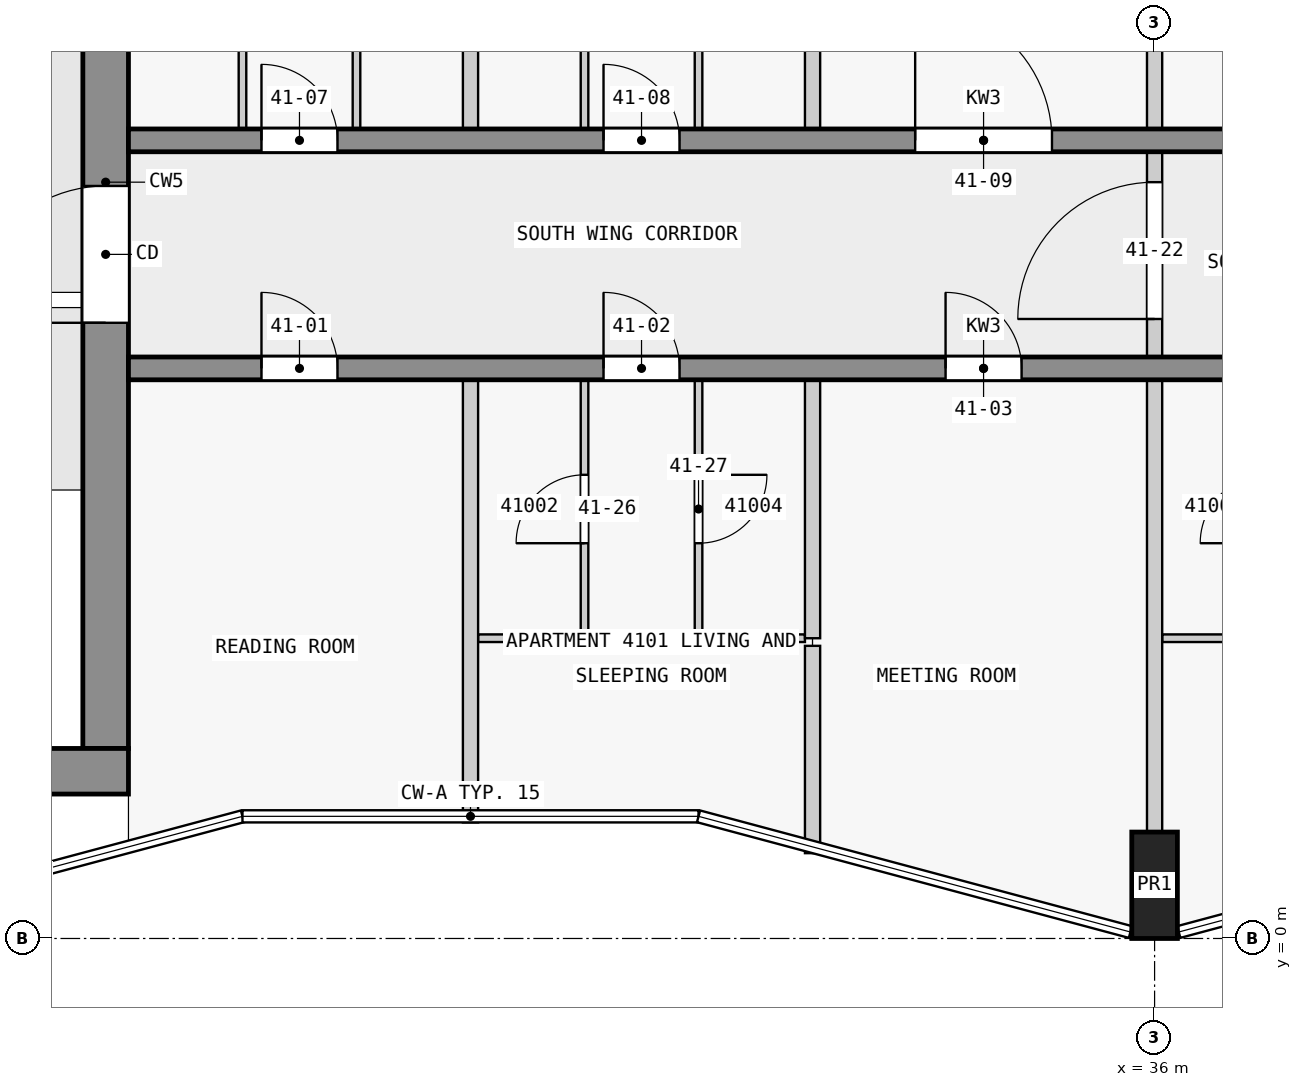
"""IFC4 building model, lengths in metres.
Left out: names, types, materials, properties, quantities, classifications, styles, units other than length and angle.
Written with IfcOpenShell. Run it as: python <this file> out.ifc"""

import sys

from ifc_helpers import new_model, si_unit, direction, frame, frame_2d, origin, origin_2d, place, context, subcontext, project, spatial, rectangle, extrude, element, fill, save


model = new_model("IFC4")
c1 = context("Model", 3, precision=1e-05, world=origin(), true_north=direction((0.0, 1.0)))
c2 = subcontext(c1, "Body", "Model", "MODEL_VIEW")
j1 = project(units=[si_unit("LENGTHUNIT", "METRE"), si_unit("PLANEANGLEUNIT", "RADIAN")], contexts=[c1])
p1 = place(None, origin())
s1 = spatial("IfcSite", under=j1, at=p1, CompositionType="ELEMENT")
p2 = place(p1, origin())
s2 = spatial("IfcBuilding", under=s1, at=p2, CompositionType="ELEMENT")
p3 = place(p2, frame((0.0, 0.0, 160.4)))
s3 = spatial("IfcBuildingStorey", under=s2, at=p3, CompositionType="ELEMENT", Elevation=160.4)
p4 = place(p3, frame((36.0, 0.7, 0.0), z_axis=(0.0, 0.0, 1.0), x_axis=(1.0, 0.0, 0.0)))
e1 = element("IfcColumn", 1, at=p4, inside=s3, PredefinedType="COLUMN", context=c2, shape_type="SweptSolid", body=[
    extrude(rectangle(XDim=0.6, YDim=1.4, at=origin_2d()), origin(), (0.0, 0.0, 1.0), 3.5),
])
p5 = place(p3, frame((1.7, 2.2, 0.0), z_axis=(0.0, 0.0, 1.0), x_axis=(1.0, 0.0, 0.0)))
e2 = element("IfcWall", 2, at=p5, inside=s3, PredefinedType="SHEAR", context=c2, shape_type="SweptSolid", body=[
    extrude(rectangle(XDim=20.8, YDim=0.6, at=frame_2d((10.4, 0.0))), origin(), (0.0, 0.0, 1.0), 3.25),
])
p6 = place(p3, frame((22.2, 2.5, 0.0), z_axis=(0.0, 0.0, 1.0), x_axis=(0.0, 1.0, 0.0)))
e3 = element("IfcWall", 3, at=p6, inside=s3, PredefinedType="SHEAR", context=c2, shape_type="SweptSolid", body=[
    extrude(rectangle(XDim=14.9, YDim=0.6, at=frame_2d((7.45, 0.0))), origin(), (0.0, 0.0, 1.0), 3.25),
])
p7 = place(p6, frame((5.6, 0.0, 0.0)))
e4 = element("IfcOpeningElement", 4, at=p7, cuts=e3, PredefinedType="OPENING", context=c2, shape_type="SweptSolid", body=[
    extrude(rectangle(XDim=1.8, YDim=2.1, at=frame_2d((0.9, 1.05))), frame((0.0, 0.31, 0.0), z_axis=(0.0, -1.0, 0.0), x_axis=(1.0, 0.0, 0.0)), (0.0, 0.0, 1.0), 0.62),
])
p8 = place(p3, frame((22.5, 7.5, 0.0), z_axis=(0.0, 0.0, 1.0), x_axis=(1.0, 0.0, 0.0)))
e5 = element("IfcWall", 5, at=p8, inside=s3, PredefinedType="SHEAR", context=c2, shape_type="SweptSolid", body=[
    extrude(rectangle(XDim=22.5, YDim=0.3, at=frame_2d((11.25, 0.0))), origin(), (0.0, 0.0, 1.0), 3.25),
])
p9 = place(p8, frame((1.75, 0.0, 0.0)))
e6 = element("IfcOpeningElement", 6, at=p9, cuts=e5, PredefinedType="OPENING", context=c2, shape_type="SweptSolid", body=[
    extrude(rectangle(XDim=1.0, YDim=2.1, at=frame_2d((0.5, 1.05))), frame((0.0, 0.16, 0.0), z_axis=(0.0, -1.0, 0.0), x_axis=(1.0, 0.0, 0.0)), (0.0, 0.0, 1.0), 0.32),
])
p10 = place(p8, frame((6.25, 0.0, 0.0)))
e7 = element("IfcOpeningElement", 7, at=p10, cuts=e5, PredefinedType="OPENING", context=c2, shape_type="SweptSolid", body=[
    extrude(rectangle(XDim=1.0, YDim=2.1, at=frame_2d((0.5, 1.05))), frame((0.0, 0.16, 0.0), z_axis=(0.0, -1.0, 0.0), x_axis=(1.0, 0.0, 0.0)), (0.0, 0.0, 1.0), 0.32),
])
p11 = place(p8, frame((10.75, 0.0, 0.0)))
e8 = element("IfcOpeningElement", 8, at=p11, cuts=e5, PredefinedType="OPENING", context=c2, shape_type="SweptSolid", body=[
    extrude(rectangle(XDim=1.0, YDim=2.1, at=frame_2d((0.5, 1.05))), frame((0.0, 0.16, 0.0), z_axis=(0.0, -1.0, 0.0), x_axis=(1.0, 0.0, 0.0)), (0.0, 0.0, 1.0), 0.32),
])
p12 = place(p8, frame((15.25, 0.0, 0.0)))
e9 = element("IfcOpeningElement", 9, at=p12, cuts=e5, PredefinedType="OPENING", context=c2, shape_type="SweptSolid", body=[
    extrude(rectangle(XDim=1.0, YDim=2.1, at=frame_2d((0.5, 1.05))), frame((0.0, 0.16, 0.0), z_axis=(0.0, -1.0, 0.0), x_axis=(1.0, 0.0, 0.0)), (0.0, 0.0, 1.0), 0.32),
])
p13 = place(p8, frame((18.75, 0.0, 0.0)))
e10 = element("IfcOpeningElement", 10, at=p13, cuts=e5, PredefinedType="OPENING", context=c2, shape_type="SweptSolid", body=[
    extrude(rectangle(XDim=0.9, YDim=2.1, at=frame_2d((0.45, 1.05))), frame((0.0, 0.16, 0.0), z_axis=(0.0, -1.0, 0.0), x_axis=(1.0, 0.0, 0.0)), (0.0, 0.0, 1.0), 0.32),
])
p14 = place(p8, frame((20.95, 0.0, 0.0)))
e11 = element("IfcOpeningElement", 11, at=p14, cuts=e5, PredefinedType="OPENING", context=c2, shape_type="SweptSolid", body=[
    extrude(rectangle(XDim=1.0, YDim=2.1, at=frame_2d((0.5, 1.05))), frame((0.0, 0.16, 0.0), z_axis=(0.0, -1.0, 0.0), x_axis=(1.0, 0.0, 0.0)), (0.0, 0.0, 1.0), 0.32),
])
p15 = place(p3, frame((22.5, 10.5, 0.0), z_axis=(0.0, 0.0, 1.0), x_axis=(1.0, 0.0, 0.0)))
e12 = element("IfcWall", 12, at=p15, inside=s3, PredefinedType="SHEAR", context=c2, shape_type="SweptSolid", body=[
    extrude(rectangle(XDim=22.5, YDim=0.3, at=frame_2d((11.25, 0.0))), origin(), (0.0, 0.0, 1.0), 3.25),
])
p16 = place(p15, frame((1.75, 0.0, 0.0)))
e13 = element("IfcOpeningElement", 13, at=p16, cuts=e12, PredefinedType="OPENING", context=c2, shape_type="SweptSolid", body=[
    extrude(rectangle(XDim=1.0, YDim=2.1, at=frame_2d((0.5, 1.05))), frame((0.0, 0.16, 0.0), z_axis=(0.0, -1.0, 0.0), x_axis=(1.0, 0.0, 0.0)), (0.0, 0.0, 1.0), 0.32),
])
p17 = place(p15, frame((6.25, 0.0, 0.0)))
e14 = element("IfcOpeningElement", 14, at=p17, cuts=e12, PredefinedType="OPENING", context=c2, shape_type="SweptSolid", body=[
    extrude(rectangle(XDim=1.0, YDim=2.1, at=frame_2d((0.5, 1.05))), frame((0.0, 0.16, 0.0), z_axis=(0.0, -1.0, 0.0), x_axis=(1.0, 0.0, 0.0)), (0.0, 0.0, 1.0), 0.32),
])
p18 = place(p15, frame((10.35, 0.0, 0.0)))
e15 = element("IfcOpeningElement", 15, at=p18, cuts=e12, PredefinedType="OPENING", context=c2, shape_type="SweptSolid", body=[
    extrude(rectangle(XDim=1.8, YDim=2.1, at=frame_2d((0.9, 1.05))), frame((0.0, 0.16, 0.0), z_axis=(0.0, -1.0, 0.0), x_axis=(1.0, 0.0, 0.0)), (0.0, 0.0, 1.0), 0.32),
])
p19 = place(p15, frame((16.85, 0.0, 0.0)))
e16 = element("IfcOpeningElement", 16, at=p19, cuts=e12, PredefinedType="OPENING", context=c2, shape_type="SweptSolid", body=[
    extrude(rectangle(XDim=1.0, YDim=2.1, at=frame_2d((0.5, 1.05))), frame((0.0, 0.16, 0.0), z_axis=(0.0, -1.0, 0.0), x_axis=(1.0, 0.0, 0.0)), (0.0, 0.0, 1.0), 0.32),
])
for number, where, z_axis, x_axis in (
    (17, (27.1, 3.95, 0.0), (0.0, 0.0, 1.0), (1.0, 0.0, 0.0)),
    (18, (30.05, 3.95, 0.0), (0.0, 0.0, 1.0), (1.0, 0.0, 0.0)),
    (19, (36.1, 3.95, 0.0), (0.0, 0.0, 1.0), (1.0, 0.0, 0.0)),
):
    element("IfcWall", number, at=place(p3, frame(where, z_axis=z_axis, x_axis=x_axis)), inside=s3, PredefinedType="PARTITIONING", context=c2, shape_type="SweptSolid", body=[
        extrude(rectangle(XDim=1.35, YDim=0.1, at=frame_2d((0.675, 0.0))), origin(), (0.0, 0.0, 1.0), 3.25),
    ])
p20 = place(p3, frame((24.0, 10.65, 0.0), z_axis=(0.0, 0.0, 1.0), x_axis=(0.0, 1.0, 0.0)))
e20 = element("IfcWall", 20, at=p20, inside=s3, PredefinedType="PARTITIONING", context=c2, shape_type="SweptSolid", body=[
    extrude(rectangle(XDim=3.4, YDim=0.1, at=frame_2d((1.7, 0.0))), origin(), (0.0, 0.0, 1.0), 3.25),
])
p21 = place(p20, frame((1.25, 0.0, 0.0)))
e21 = element("IfcOpeningElement", 21, at=p21, cuts=e20, PredefinedType="OPENING", context=c2, shape_type="SweptSolid", body=[
    extrude(rectangle(XDim=0.9, YDim=2.1, at=frame_2d((0.45, 1.05))), frame((0.0, 0.06, 0.0), z_axis=(0.0, -1.0, 0.0), x_axis=(1.0, 0.0, 0.0)), (0.0, 0.0, 1.0), 0.12),
])
p22 = place(p3, frame((25.5, 14.05, 0.0), z_axis=(0.0, 0.0, 1.0), x_axis=(0.0, -1.0, 0.0)))
e22 = element("IfcWall", 22, at=p22, inside=s3, PredefinedType="PARTITIONING", context=c2, shape_type="SweptSolid", body=[
    extrude(rectangle(XDim=3.4, YDim=0.1, at=frame_2d((1.7, 0.0))), origin(), (0.0, 0.0, 1.0), 3.25),
])
p23 = place(p22, frame((1.25, 0.0, 0.0)))
e23 = element("IfcOpeningElement", 23, at=p23, cuts=e22, PredefinedType="OPENING", context=c2, shape_type="SweptSolid", body=[
    extrude(rectangle(XDim=0.9, YDim=2.1, at=frame_2d((0.45, 1.05))), frame((0.0, 0.06, 0.0), z_axis=(0.0, -1.0, 0.0), x_axis=(1.0, 0.0, 0.0)), (0.0, 0.0, 1.0), 0.12),
])
p24 = place(p3, frame((27.0, 1.527, 0.0), z_axis=(0.0, 0.0, 1.0), x_axis=(0.0, 1.0, 0.0)))
e24 = element("IfcWall", 24, at=p24, inside=s3, PredefinedType="PARTITIONING", context=c2, shape_type="SweptSolid", body=[
    extrude(rectangle(XDim=5.823, YDim=0.2, at=frame_2d((2.912, 0.0))), origin(), (0.0, 0.0, 1.0), 3.25),
])
p25 = place(p3, frame((27.0, 10.65, 0.0), z_axis=(0.0, 0.0, 1.0), x_axis=(0.0, 1.0, 0.0)))
e25 = element("IfcWall", 25, at=p25, inside=s3, PredefinedType="PARTITIONING", context=c2, shape_type="SweptSolid", body=[
    extrude(rectangle(XDim=3.4, YDim=0.2, at=frame_2d((1.7, 0.0))), origin(), (0.0, 0.0, 1.0), 3.25),
])
p26 = place(p3, frame((28.5, 3.95, 0.0), z_axis=(0.0, 0.0, 1.0), x_axis=(0.0, 1.0, 0.0)))
e26 = element("IfcWall", 26, at=p26, inside=s3, PredefinedType="PARTITIONING", context=c2, shape_type="SweptSolid", body=[
    extrude(rectangle(XDim=3.4, YDim=0.1, at=frame_2d((1.7, 0.0))), origin(), (0.0, 0.0, 1.0), 3.25),
])
p27 = place(p26, frame((1.25, 0.0, 0.0)))
e27 = element("IfcOpeningElement", 27, at=p27, cuts=e26, PredefinedType="OPENING", context=c2, shape_type="SweptSolid", body=[
    extrude(rectangle(XDim=0.9, YDim=2.1, at=frame_2d((0.45, 1.05))), frame((0.0, 0.06, 0.0), z_axis=(0.0, -1.0, 0.0), x_axis=(1.0, 0.0, 0.0)), (0.0, 0.0, 1.0), 0.12),
])
p28 = place(p3, frame((28.5, 10.65, 0.0), z_axis=(0.0, 0.0, 1.0), x_axis=(0.0, 1.0, 0.0)))
e28 = element("IfcWall", 28, at=p28, inside=s3, PredefinedType="PARTITIONING", context=c2, shape_type="SweptSolid", body=[
    extrude(rectangle(XDim=3.4, YDim=0.1, at=frame_2d((1.7, 0.0))), origin(), (0.0, 0.0, 1.0), 3.25),
])
p29 = place(p28, frame((1.25, 0.0, 0.0)))
e29 = element("IfcOpeningElement", 29, at=p29, cuts=e28, PredefinedType="OPENING", context=c2, shape_type="SweptSolid", body=[
    extrude(rectangle(XDim=0.9, YDim=2.1, at=frame_2d((0.45, 1.05))), frame((0.0, 0.06, 0.0), z_axis=(0.0, -1.0, 0.0), x_axis=(1.0, 0.0, 0.0)), (0.0, 0.0, 1.0), 0.12),
])
p30 = place(p3, frame((30.0, 7.35, 0.0), z_axis=(0.0, 0.0, 1.0), x_axis=(0.0, -1.0, 0.0)))
e30 = element("IfcWall", 30, at=p30, inside=s3, PredefinedType="PARTITIONING", context=c2, shape_type="SweptSolid", body=[
    extrude(rectangle(XDim=3.4, YDim=0.1, at=frame_2d((1.7, 0.0))), origin(), (0.0, 0.0, 1.0), 3.25),
])
p31 = place(p30, frame((1.25, 0.0, 0.0)))
e31 = element("IfcOpeningElement", 31, at=p31, cuts=e30, PredefinedType="OPENING", context=c2, shape_type="SweptSolid", body=[
    extrude(rectangle(XDim=0.9, YDim=2.1, at=frame_2d((0.45, 1.05))), frame((0.0, 0.06, 0.0), z_axis=(0.0, -1.0, 0.0), x_axis=(1.0, 0.0, 0.0)), (0.0, 0.0, 1.0), 0.12),
])
p32 = place(p3, frame((30.0, 14.05, 0.0), z_axis=(0.0, 0.0, 1.0), x_axis=(0.0, -1.0, 0.0)))
e32 = element("IfcWall", 32, at=p32, inside=s3, PredefinedType="PARTITIONING", context=c2, shape_type="SweptSolid", body=[
    extrude(rectangle(XDim=3.4, YDim=0.1, at=frame_2d((1.7, 0.0))), origin(), (0.0, 0.0, 1.0), 3.25),
])
p33 = place(p32, frame((1.25, 0.0, 0.0)))
e33 = element("IfcOpeningElement", 33, at=p33, cuts=e32, PredefinedType="OPENING", context=c2, shape_type="SweptSolid", body=[
    extrude(rectangle(XDim=0.9, YDim=2.1, at=frame_2d((0.45, 1.05))), frame((0.0, 0.06, 0.0), z_axis=(0.0, -1.0, 0.0), x_axis=(1.0, 0.0, 0.0)), (0.0, 0.0, 1.0), 0.12),
])
p34 = place(p3, frame((31.5, 3.85, 0.0), z_axis=(0.0, 0.0, 1.0), x_axis=(0.0, -1.0, 0.0)))
e34 = element("IfcWall", 34, at=p34, inside=s3, PredefinedType="PARTITIONING", context=c2, shape_type="SweptSolid", body=[
    extrude(rectangle(XDim=2.728, YDim=0.2, at=frame_2d((1.364, 0.0))), origin(), (0.0, 0.0, 1.0), 3.25),
])
for number, where, z_axis, x_axis in (
    (35, (31.5, 3.95, 0.0), (0.0, 0.0, 1.0), (0.0, 1.0, 0.0)),
    (36, (31.5, 10.65, 0.0), (0.0, 0.0, 1.0), (0.0, 1.0, 0.0)),
):
    element("IfcWall", number, at=place(p3, frame(where, z_axis=z_axis, x_axis=x_axis)), inside=s3, PredefinedType="PARTITIONING", context=c2, shape_type="SweptSolid", body=[
        extrude(rectangle(XDim=3.4, YDim=0.2, at=frame_2d((1.7, 0.0))), origin(), (0.0, 0.0, 1.0), 3.25),
    ])
for number, where, z_axis, x_axis in (
    (37, (36.0, 1.4, 0.0), (0.0, 0.0, 1.0), (0.0, 1.0, 0.0)),
    (38, (36.0, 10.65, 0.0), (0.0, 0.0, 1.0), (0.0, 1.0, 0.0)),
):
    element("IfcWall", number, at=place(p3, frame(where, z_axis=z_axis, x_axis=x_axis)), inside=s3, PredefinedType="PARTITIONING", context=c2, shape_type="SweptSolid", body=[
        extrude(rectangle(XDim=5.95, YDim=0.2, at=frame_2d((2.975, 0.0))), origin(), (0.0, 0.0, 1.0), 3.25),
    ])
p35 = place(p3, frame((36.0, 7.45, 0.0), z_axis=(0.0, 0.0, 1.0), x_axis=(0.0, 1.0, 0.0)))
e39 = element("IfcWall", 39, at=p35, inside=s3, PredefinedType="PARTITIONING", context=c2, shape_type="SweptSolid", body=[
    extrude(rectangle(XDim=3.1, YDim=0.2, at=frame_2d((1.55, 0.0))), origin(), (0.0, 0.0, 1.0), 3.25),
])
p36 = place(p35, frame((0.7, 0.0, 0.0)))
e40 = element("IfcOpeningElement", 40, at=p36, cuts=e39, PredefinedType="OPENING", context=c2, shape_type="SweptSolid", body=[
    extrude(rectangle(XDim=1.8, YDim=2.1, at=frame_2d((0.9, 1.05))), frame((0.0, 0.11, 0.0), z_axis=(0.0, -1.0, 0.0), x_axis=(1.0, 0.0, 0.0)), (0.0, 0.0, 1.0), 0.22),
])
p37 = place(p7, origin())
e41 = element("IfcDoor", 41, at=p37, inside=s3, OperationType="DOUBLE_DOOR_SINGLE_SWING", PredefinedType="DOOR", context=c2, shape_type="SweptSolid", body=[
    extrude(rectangle(XDim=1.8, YDim=2.1, at=frame_2d((0.9, 1.05))), frame((0.0, 0.025, 0.0), z_axis=(0.0, -1.0, 0.0), x_axis=(1.0, 0.0, 0.0)), (0.0, 0.0, 1.0), 0.05),
])
fill(e4, e41)
p38 = place(p9, origin())
e42 = element("IfcDoor", 42, at=p38, inside=s3, OperationType="SINGLE_SWING_LEFT", PredefinedType="DOOR", context=c2, shape_type="SweptSolid", body=[
    extrude(rectangle(XDim=1.0, YDim=2.1, at=frame_2d((0.5, 1.05))), frame((0.0, 0.025, 0.0), z_axis=(0.0, -1.0, 0.0), x_axis=(1.0, 0.0, 0.0)), (0.0, 0.0, 1.0), 0.05),
])
fill(e6, e42)
p39 = place(p10, origin())
e43 = element("IfcDoor", 43, at=p39, inside=s3, OperationType="SINGLE_SWING_LEFT", PredefinedType="DOOR", context=c2, shape_type="SweptSolid", body=[
    extrude(rectangle(XDim=1.0, YDim=2.1, at=frame_2d((0.5, 1.05))), frame((0.0, 0.025, 0.0), z_axis=(0.0, -1.0, 0.0), x_axis=(1.0, 0.0, 0.0)), (0.0, 0.0, 1.0), 0.05),
])
fill(e7, e43)
p40 = place(p11, origin())
e44 = element("IfcDoor", 44, at=p40, inside=s3, OperationType="SINGLE_SWING_LEFT", PredefinedType="DOOR", context=c2, shape_type="SweptSolid", body=[
    extrude(rectangle(XDim=1.0, YDim=2.1, at=frame_2d((0.5, 1.05))), frame((0.0, 0.025, 0.0), z_axis=(0.0, -1.0, 0.0), x_axis=(1.0, 0.0, 0.0)), (0.0, 0.0, 1.0), 0.05),
])
fill(e8, e44)
p41 = place(p16, origin())
e45 = element("IfcDoor", 45, at=p41, inside=s3, OperationType="SINGLE_SWING_LEFT", PredefinedType="DOOR", context=c2, shape_type="SweptSolid", body=[
    extrude(rectangle(XDim=1.0, YDim=2.1, at=frame_2d((0.5, 1.05))), frame((0.0, 0.025, 0.0), z_axis=(0.0, -1.0, 0.0), x_axis=(1.0, 0.0, 0.0)), (0.0, 0.0, 1.0), 0.05),
])
fill(e13, e45)
p42 = place(p17, origin())
e46 = element("IfcDoor", 46, at=p42, inside=s3, OperationType="SINGLE_SWING_LEFT", PredefinedType="DOOR", context=c2, shape_type="SweptSolid", body=[
    extrude(rectangle(XDim=1.0, YDim=2.1, at=frame_2d((0.5, 1.05))), frame((0.0, 0.025, 0.0), z_axis=(0.0, -1.0, 0.0), x_axis=(1.0, 0.0, 0.0)), (0.0, 0.0, 1.0), 0.05),
])
fill(e14, e46)
p43 = place(p18, origin())
e47 = element("IfcDoor", 47, at=p43, inside=s3, OperationType="SINGLE_SWING_LEFT", PredefinedType="DOOR", context=c2, shape_type="SweptSolid", body=[
    extrude(rectangle(XDim=1.8, YDim=2.1, at=frame_2d((0.9, 1.05))), frame((0.0, 0.025, 0.0), z_axis=(0.0, -1.0, 0.0), x_axis=(1.0, 0.0, 0.0)), (0.0, 0.0, 1.0), 0.05),
])
fill(e15, e47)
p44 = place(p36, origin())
e48 = element("IfcDoor", 48, at=p44, inside=s3, OperationType="SINGLE_SWING_RIGHT", PredefinedType="DOOR", context=c2, shape_type="SweptSolid", body=[
    extrude(rectangle(XDim=1.8, YDim=2.1, at=frame_2d((0.9, 1.05))), frame((0.0, 0.025, 0.0), z_axis=(0.0, -1.0, 0.0), x_axis=(1.0, 0.0, 0.0)), (0.0, 0.0, 1.0), 0.05),
])
fill(e40, e48)
p45 = place(p27, origin())
e49 = element("IfcDoor", 49, at=p45, inside=s3, OperationType="SINGLE_SWING_RIGHT", PredefinedType="DOOR", context=c2, shape_type="SweptSolid", body=[
    extrude(rectangle(XDim=0.9, YDim=2.1, at=frame_2d((0.45, 1.05))), frame((0.0, 0.025, 0.0), z_axis=(0.0, -1.0, 0.0), x_axis=(1.0, 0.0, 0.0)), (0.0, 0.0, 1.0), 0.05),
])
fill(e27, e49)
p46 = place(p31, origin())
e50 = element("IfcDoor", 50, at=p46, inside=s3, OperationType="SINGLE_SWING_RIGHT", PredefinedType="DOOR", context=c2, shape_type="SweptSolid", body=[
    extrude(rectangle(XDim=0.9, YDim=2.1, at=frame_2d((0.45, 1.05))), frame((0.0, 0.025, 0.0), z_axis=(0.0, -1.0, 0.0), x_axis=(1.0, 0.0, 0.0)), (0.0, 0.0, 1.0), 0.05),
])
fill(e31, e50)
save(model, sys.argv[1])
